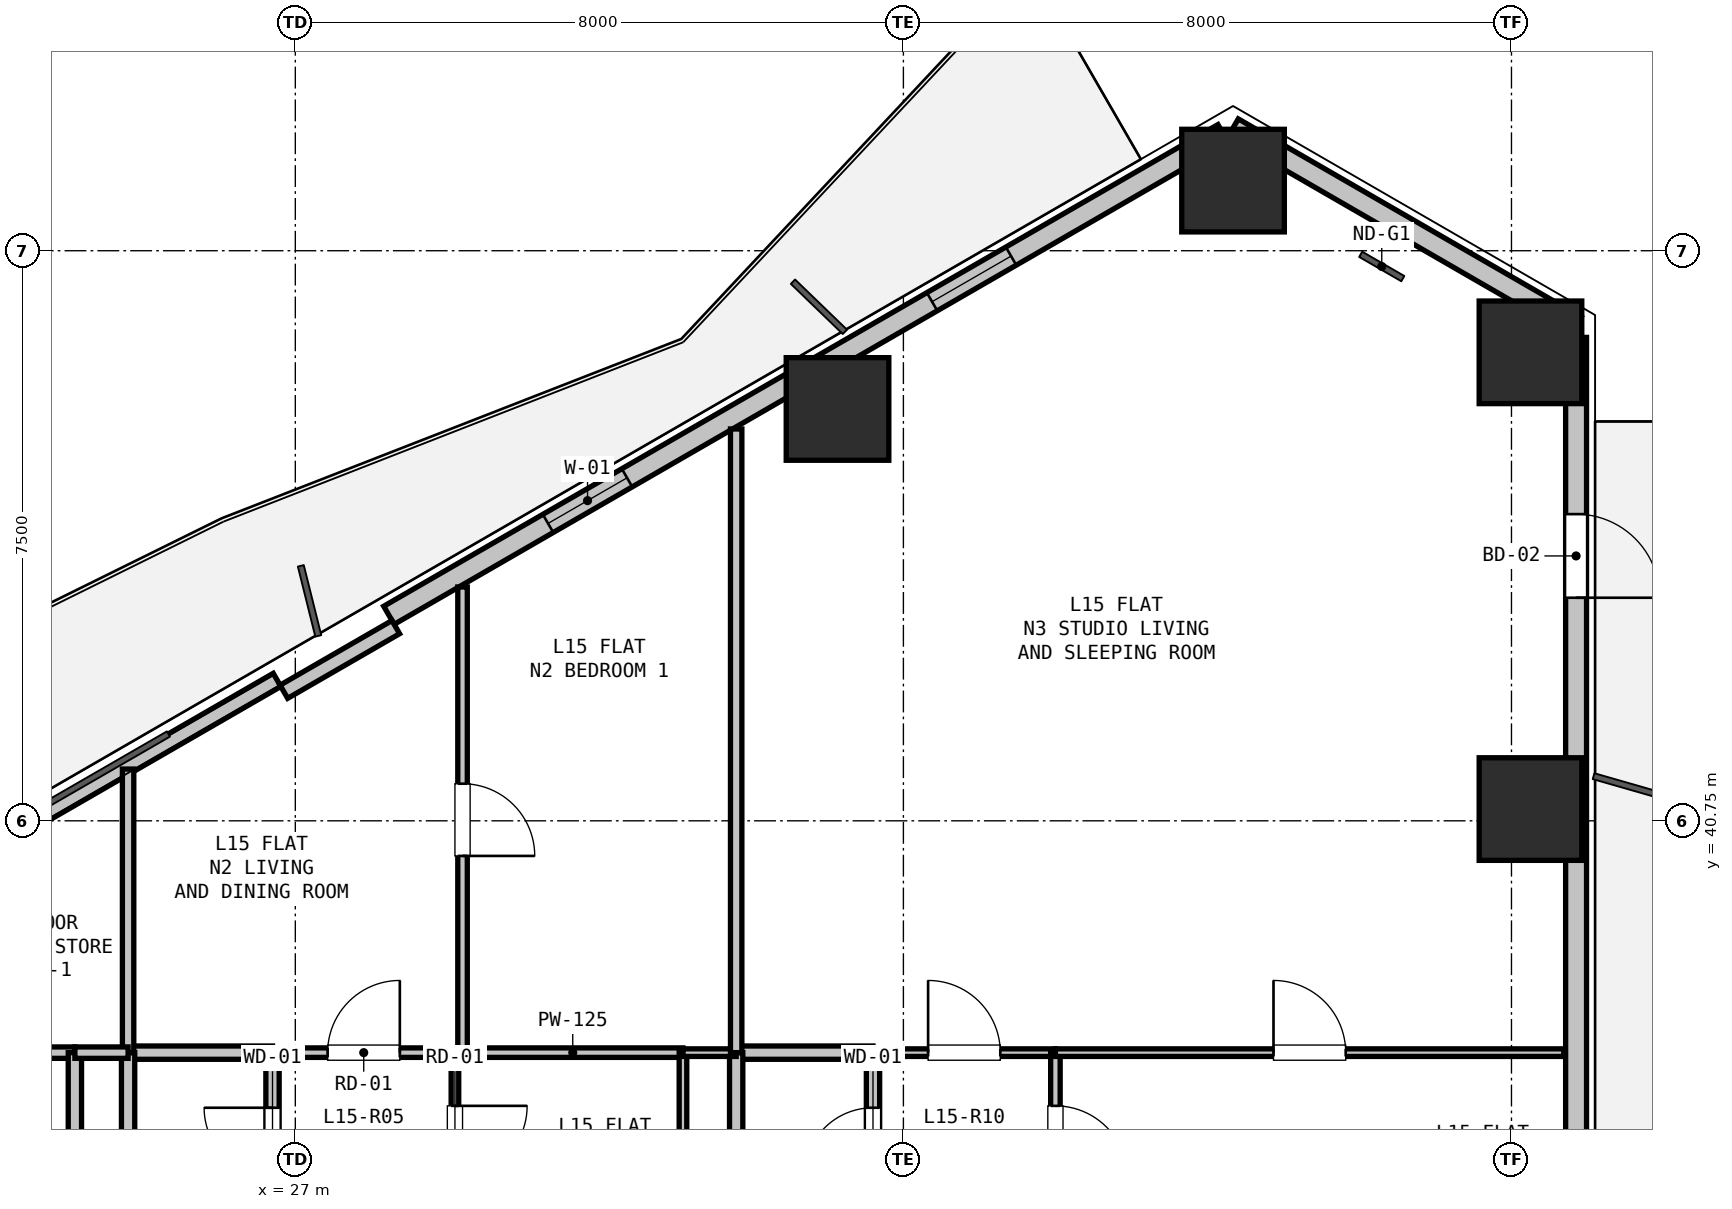
"""IFC4 building model, lengths in metres.
Left out: names, types, materials, properties, quantities, classifications, styles, units other than length and angle.
Written with IfcOpenShell. Run it as: python <this file> out.ifc"""

import sys

from ifc_helpers import new_model, si_unit, direction, frame, frame_2d, origin, origin_2d, place, context, subcontext, project, spatial, rectangle, hollow_rectangle, extrude, element, fill, save


model = new_model("IFC4")
c1 = context("Model", 3, precision=1e-05, world=origin(), true_north=direction((0.0, 1.0)))
c2 = subcontext(c1, "Body", "Model", "MODEL_VIEW")
j1 = project(units=[si_unit("LENGTHUNIT", "METRE"), si_unit("PLANEANGLEUNIT", "RADIAN")], contexts=[c1])
p1 = place(None, origin())
s1 = spatial("IfcSite", under=j1, at=p1, CompositionType="ELEMENT")
p2 = place(p1, origin())
s2 = spatial("IfcBuilding", under=s1, at=p2, CompositionType="ELEMENT")
p3 = place(p2, frame((0.0, 0.0, 55.5)))
s3 = spatial("IfcBuildingStorey", under=s2, at=p3, CompositionType="ELEMENT", Elevation=55.5)
for number, where, z_axis, x_axis in (
    (1, (34.133, 46.168, 0.0), (0.0, 0.0, 1.0), (1.0, 0.0, 0.0)),
    (2, (39.337, 49.173, 0.0), (0.0, 0.0, 1.0), (1.0, 0.0, 0.0)),
    (3, (43.25, 46.913, 0.0), (0.0, 0.0, 1.0), (1.0, 0.0, 0.0)),
    (4, (43.25, 40.905, 0.0), (0.0, 0.0, 1.0), (1.0, 0.0, 0.0)),
):
    element("IfcColumn", number, at=place(p3, frame(where, z_axis=z_axis, x_axis=x_axis)), inside=s3, PredefinedType="COLUMN", context=c2, shape_type="SweptSolid", body=[
        extrude(hollow_rectangle(XDim=1.35, YDim=1.35, WallThickness=0.036, at=origin_2d()), origin(), (0.0, 0.0, 1.0), 3.3),
    ])
p4 = place(p3, frame((39.337, 49.865, 0.0), z_axis=(0.0, 0.0, 1.0), x_axis=(0.866043601342, -0.499968479581, 0.0)))
e5 = element("IfcWall", 5, at=p4, inside=s3, PredefinedType="SOLIDWALL", context=c2, shape_type="SweptSolid", body=[
    extrude(rectangle(XDim=5.211, YDim=0.275, at=frame_2d((2.605, 0.0))), origin(), (0.0, 0.0, 1.0), 2.66),
])
p5 = place(p3, frame((16.39, 36.617, 0.0), z_axis=(0.0, 0.0, 1.0), x_axis=(0.866027351828, 0.499996625875, 0.0)))
e6 = element("IfcWall", 6, at=p5, inside=s3, PredefinedType="PARAPET", context=c2, shape_type="SweptSolid", body=[
    extrude(rectangle(XDim=11.973, YDim=0.2, at=frame_2d((5.987, 0.0))), origin(), (0.0, 0.0, 1.0), 0.2),
])
p6 = place(p3, frame((28.232, 43.454, 0.0), z_axis=(0.0, 0.0, 1.0), x_axis=(0.86603192154, 0.499988710747, 0.0)))
e7 = element("IfcWall", 7, at=p6, inside=s3, PredefinedType="SOLIDWALL", context=c2, shape_type="SweptSolid", body=[
    extrude(rectangle(XDim=12.673, YDim=0.275, at=frame_2d((6.336, 0.0))), origin(), (0.0, 0.0, 1.0), 2.66),
])
p7 = place(p6, frame((2.417, 0.0, 0.9)))
e8 = element("IfcOpeningElement", 8, at=p7, cuts=e7, PredefinedType="OPENING", context=c2, shape_type="SweptSolid", body=[
    extrude(rectangle(XDim=1.2, YDim=1.4, at=frame_2d((0.6, 0.7))), frame((0.0, 0.147, 0.0), z_axis=(0.0, -1.0, 0.0), x_axis=(1.0, 0.0, 0.0)), (0.0, 0.0, 1.0), 0.295),
])
p8 = place(p6, frame((8.251, 0.0, 0.9)))
e9 = element("IfcOpeningElement", 9, at=p8, cuts=e7, PredefinedType="OPENING", context=c2, shape_type="SweptSolid", body=[
    extrude(rectangle(XDim=1.2, YDim=1.4, at=frame_2d((0.6, 0.7))), frame((0.0, 0.147, 0.0), z_axis=(0.0, -1.0, 0.0), x_axis=(1.0, 0.0, 0.0)), (0.0, 0.0, 1.0), 0.295),
])
p9 = place(p3, frame((26.85, 42.448, 0.0), z_axis=(0.0, 0.0, 1.0), x_axis=(0.86605165483, 0.499954529098, 0.0)))
e10 = element("IfcWall", 10, at=p9, inside=s3, PredefinedType="PARAPET", context=c2, shape_type="SweptSolid", body=[
    extrude(rectangle(XDim=1.7, YDim=0.2, at=frame_2d((0.85, 0.0))), origin(), (0.0, 0.0, 1.0), 2.66),
])
p10 = place(p3, frame((43.85, 47.11, 0.0), z_axis=(0.0, 0.0, 1.0), x_axis=(0.0, -1.0, 0.0)))
e11 = element("IfcWall", 11, at=p10, inside=s3, PredefinedType="SOLIDWALL", context=c2, shape_type="SweptSolid", body=[
    extrude(rectangle(XDim=12.673, YDim=0.275, at=frame_2d((6.336, 0.0))), origin(), (0.0, 0.0, 1.0), 2.66),
])
p11 = place(p10, frame((2.325, 0.0, 0.0)))
e12 = element("IfcOpeningElement", 12, at=p11, cuts=e11, PredefinedType="OPENING", context=c2, shape_type="SweptSolid", body=[
    extrude(rectangle(XDim=1.1, YDim=2.1, at=frame_2d((0.55, 1.05))), frame((0.0, 0.147, 0.0), z_axis=(0.0, -1.0, 0.0), x_axis=(1.0, 0.0, 0.0)), (0.0, 0.0, 1.0), 0.295),
])
p12 = place(p3, frame((26.7, 37.7, 0.0), z_axis=(0.0, 0.0, 1.0), x_axis=(1.0, 0.0, 0.0)))
e13 = element("IfcWall", 13, at=p12, inside=s3, PredefinedType="PARTITIONING", context=c2, shape_type="SweptSolid", body=[
    extrude(rectangle(XDim=2.4, YDim=0.125, at=frame_2d((1.2, 0.0))), origin(), (0.0, 0.0, 1.0), 3.04),
])
p13 = place(p12, frame((0.725, 0.0, 0.0)))
e14 = element("IfcOpeningElement", 14, at=p13, cuts=e13, PredefinedType="OPENING", context=c2, shape_type="SweptSolid", body=[
    extrude(rectangle(XDim=0.95, YDim=2.1, at=frame_2d((0.475, 1.05))), frame((0.0, 0.073, 0.0), z_axis=(0.0, -1.0, 0.0), x_axis=(1.0, 0.0, 0.0)), (0.0, 0.0, 1.0), 0.145),
])
p14 = place(p3, frame((29.1, 37.7, 0.0), z_axis=(0.0, 0.0, 1.0), x_axis=(0.0, -1.0, 0.0)))
e15 = element("IfcWall", 15, at=p14, inside=s3, PredefinedType="PARTITIONING", context=c2, shape_type="SweptSolid", body=[
    extrude(rectangle(XDim=2.35, YDim=0.1, at=frame_2d((1.175, 0.0))), origin(), (0.0, 0.0, 1.0), 3.04),
])
p15 = place(p14, frame((0.7, 0.0, 0.0)))
e16 = element("IfcOpeningElement", 16, at=p15, cuts=e15, PredefinedType="OPENING", context=c2, shape_type="SweptSolid", body=[
    extrude(rectangle(XDim=0.95, YDim=2.1, at=frame_2d((0.475, 1.05))), frame((0.0, 0.06, 0.0), z_axis=(0.0, -1.0, 0.0), x_axis=(1.0, 0.0, 0.0)), (0.0, 0.0, 1.0), 0.12),
])
p16 = place(p3, frame((26.7, 35.35, 0.0), z_axis=(0.0, 0.0, 1.0), x_axis=(0.0, 1.0, 0.0)))
e17 = element("IfcWall", 17, at=p16, inside=s3, PredefinedType="PLUMBINGWALL", context=c2, shape_type="SweptSolid", body=[
    extrude(rectangle(XDim=2.35, YDim=0.175, at=frame_2d((1.175, 0.0))), origin(), (0.0, 0.0, 1.0), 3.04),
])
p17 = place(p16, frame((0.725, 0.0, 0.0)))
e18 = element("IfcOpeningElement", 18, at=p17, cuts=e17, PredefinedType="OPENING", context=c2, shape_type="SweptSolid", body=[
    extrude(rectangle(XDim=0.9, YDim=2.1, at=frame_2d((0.45, 1.05))), frame((0.0, 0.097, 0.0), z_axis=(0.0, -1.0, 0.0), x_axis=(1.0, 0.0, 0.0)), (0.0, 0.0, 1.0), 0.195),
])
p18 = place(p3, frame((34.6, 37.7, 0.0), z_axis=(0.0, 0.0, 1.0), x_axis=(1.0, 0.0, 0.0)))
e19 = element("IfcWall", 19, at=p18, inside=s3, PredefinedType="PARTITIONING", context=c2, shape_type="SweptSolid", body=[
    extrude(rectangle(XDim=2.4, YDim=0.1, at=frame_2d((1.2, 0.0))), origin(), (0.0, 0.0, 1.0), 2.337),
])
p19 = place(p18, frame((0.725, 0.0, 0.0)))
e20 = element("IfcOpeningElement", 20, at=p19, cuts=e19, PredefinedType="OPENING", context=c2, shape_type="SweptSolid", body=[
    extrude(rectangle(XDim=0.95, YDim=2.1, at=frame_2d((0.475, 1.05))), frame((0.0, 0.06, 0.0), z_axis=(0.0, -1.0, 0.0), x_axis=(1.0, 0.0, 0.0)), (0.0, 0.0, 1.0), 0.12),
])
p20 = place(p3, frame((37.0, 37.7, 0.0), z_axis=(0.0, 0.0, 1.0), x_axis=(0.0, -1.0, 0.0)))
e21 = element("IfcWall", 21, at=p20, inside=s3, PredefinedType="PARTITIONING", context=c2, shape_type="SweptSolid", body=[
    extrude(rectangle(XDim=2.35, YDim=0.125, at=frame_2d((1.175, 0.0))), origin(), (0.0, 0.0, 1.0), 2.337),
])
p21 = place(p20, frame((0.7, 0.0, 0.0)))
e22 = element("IfcOpeningElement", 22, at=p21, cuts=e21, PredefinedType="OPENING", context=c2, shape_type="SweptSolid", body=[
    extrude(rectangle(XDim=0.95, YDim=2.1, at=frame_2d((0.475, 1.05))), frame((0.0, 0.073, 0.0), z_axis=(0.0, -1.0, 0.0), x_axis=(1.0, 0.0, 0.0)), (0.0, 0.0, 1.0), 0.145),
])
p22 = place(p3, frame((34.6, 35.35, 0.0), z_axis=(0.0, 0.0, 1.0), x_axis=(0.0, 1.0, 0.0)))
e23 = element("IfcWall", 23, at=p22, inside=s3, PredefinedType="PLUMBINGWALL", context=c2, shape_type="SweptSolid", body=[
    extrude(rectangle(XDim=2.35, YDim=0.175, at=frame_2d((1.175, 0.0))), origin(), (0.0, 0.0, 1.0), 3.04),
])
p23 = place(p22, frame((0.725, 0.0, 0.0)))
e24 = element("IfcOpeningElement", 24, at=p23, cuts=e23, PredefinedType="OPENING", context=c2, shape_type="SweptSolid", body=[
    extrude(rectangle(XDim=0.9, YDim=2.1, at=frame_2d((0.45, 1.05))), frame((0.0, 0.097, 0.0), z_axis=(0.0, -1.0, 0.0), x_axis=(1.0, 0.0, 0.0)), (0.0, 0.0, 1.0), 0.195),
])
p24 = place(p3, frame((22.3, 37.7, 0.0), z_axis=(0.0, 0.0, 1.0), x_axis=(1.0, 0.0, 0.0)))
e25 = element("IfcWall", 25, at=p24, inside=s3, PredefinedType="PARTITIONING", context=c2, shape_type="SweptSolid", body=[
    extrude(rectangle(XDim=1.8, YDim=0.15, at=frame_2d((0.9, 0.0))), origin(), (0.0, 0.0, 1.0), 3.04),
])
p25 = place(p3, frame((24.1, 37.7, 0.0), z_axis=(0.0, 0.0, 1.0), x_axis=(0.0, -1.0, 0.0)))
e26 = element("IfcWall", 26, at=p25, inside=s3, PredefinedType="PLUMBINGWALL", context=c2, shape_type="SweptSolid", body=[
    extrude(rectangle(XDim=2.35, YDim=0.175, at=frame_2d((1.175, 0.0))), origin(), (0.0, 0.0, 1.0), 3.04),
])
p26 = place(p3, frame((24.8, 37.7, 0.0), z_axis=(0.0, 0.0, 1.0), x_axis=(1.0, 0.0, 0.0)))
e27 = element("IfcWall", 27, at=p26, inside=s3, PredefinedType="PLUMBINGWALL", context=c2, shape_type="SweptSolid", body=[
    extrude(rectangle(XDim=1.9, YDim=0.175, at=frame_2d((0.95, 0.0))), origin(), (0.0, 0.0, 1.0), 3.04),
])
p27 = place(p3, frame((24.8, 35.35, 0.0), z_axis=(0.0, 0.0, 1.0), x_axis=(0.0, 1.0, 0.0)))
e28 = element("IfcWall", 28, at=p27, inside=s3, PredefinedType="PLUMBINGWALL", context=c2, shape_type="SweptSolid", body=[
    extrude(rectangle(XDim=2.35, YDim=0.175, at=frame_2d((1.175, 0.0))), origin(), (0.0, 0.0, 1.0), 3.04),
])
p28 = place(p3, frame((29.2, 37.7, 0.0), z_axis=(0.0, 0.0, 1.0), x_axis=(1.0, 0.0, 0.0)))
e29 = element("IfcWall", 29, at=p28, inside=s3, PredefinedType="PARTITIONING", context=c2, shape_type="SweptSolid", body=[
    extrude(rectangle(XDim=2.9, YDim=0.125, at=frame_2d((1.45, 0.0))), origin(), (0.0, 0.0, 1.0), 3.04),
])
p29 = place(p3, frame((32.1, 37.7, 0.0), z_axis=(0.0, 0.0, 1.0), x_axis=(0.0, -1.0, 0.0)))
e30 = element("IfcWall", 30, at=p29, inside=s3, PredefinedType="PARTITIONING", context=c2, shape_type="SweptSolid", body=[
    extrude(rectangle(XDim=2.35, YDim=0.1, at=frame_2d((1.175, 0.0))), origin(), (0.0, 0.0, 1.0), 3.04),
])
p30 = place(p3, frame((32.8, 37.7, 0.0), z_axis=(0.0, 0.0, 1.0), x_axis=(1.0, 0.0, 0.0)))
e31 = element("IfcWall", 31, at=p30, inside=s3, PredefinedType="PLUMBINGWALL", context=c2, shape_type="SweptSolid", body=[
    extrude(rectangle(XDim=1.8, YDim=0.175, at=frame_2d((0.9, 0.0))), origin(), (0.0, 0.0, 1.0), 3.04),
])
p31 = place(p3, frame((32.8, 35.35, 0.0), z_axis=(0.0, 0.0, 1.0), x_axis=(0.0, 1.0, 0.0)))
e32 = element("IfcWall", 32, at=p31, inside=s3, PredefinedType="PLUMBINGWALL", context=c2, shape_type="SweptSolid", body=[
    extrude(rectangle(XDim=2.35, YDim=0.175, at=frame_2d((1.175, 0.0))), origin(), (0.0, 0.0, 1.0), 3.04),
])
p32 = place(p3, frame((37.0, 37.7, 0.0), z_axis=(0.0, 0.0, 1.0), x_axis=(1.0, 0.0, 0.0)))
e33 = element("IfcWall", 33, at=p32, inside=s3, PredefinedType="PARTITIONING", context=c2, shape_type="SweptSolid", body=[
    extrude(rectangle(XDim=6.688, YDim=0.1, at=frame_2d((3.344, 0.0))), origin(), (0.0, 0.0, 1.0), 2.337),
])
p33 = place(p32, frame((2.869, 0.0, 0.0)))
e34 = element("IfcOpeningElement", 34, at=p33, cuts=e33, PredefinedType="OPENING", context=c2, shape_type="SweptSolid", body=[
    extrude(rectangle(XDim=0.95, YDim=2.1, at=frame_2d((0.475, 1.05))), frame((0.0, 0.06, 0.0), z_axis=(0.0, -1.0, 0.0), x_axis=(1.0, 0.0, 0.0)), (0.0, 0.0, 1.0), 0.12),
])
p34 = place(p3, frame((24.8, 41.431, 0.0), z_axis=(0.0, 0.0, 1.0), x_axis=(0.0, -1.0, 0.0)))
e35 = element("IfcWall", 35, at=p34, inside=s3, PredefinedType="PARTITIONING", context=c2, shape_type="SweptSolid", body=[
    extrude(rectangle(XDim=3.731, YDim=0.15, at=frame_2d((1.865, 0.0))), origin(), (0.0, 0.0, 1.0), 2.365),
])
p35 = place(p3, frame((24.8, 37.7, 0.0), z_axis=(0.0, 0.0, 1.0), x_axis=(-1.0, 0.0, 0.0)))
e36 = element("IfcWall", 36, at=p35, inside=s3, PredefinedType="PARTITIONING", context=c2, shape_type="SweptSolid", body=[
    extrude(rectangle(XDim=0.7, YDim=0.15, at=frame_2d((0.35, 0.0))), origin(), (0.0, 0.0, 1.0), 3.04),
])
p36 = place(p3, frame((29.2, 43.826, 0.0), z_axis=(0.0, 0.0, 1.0), x_axis=(0.0, -1.0, 0.0)))
e37 = element("IfcWall", 37, at=p36, inside=s3, PredefinedType="PARTITIONING", context=c2, shape_type="SweptSolid", body=[
    extrude(rectangle(XDim=6.126, YDim=0.125, at=frame_2d((3.063, 0.0))), origin(), (0.0, 0.0, 1.0), 2.365),
])
p37 = place(p36, frame((2.588, 0.0, 0.0)))
e38 = element("IfcOpeningElement", 38, at=p37, cuts=e37, PredefinedType="OPENING", context=c2, shape_type="SweptSolid", body=[
    extrude(rectangle(XDim=0.95, YDim=2.1, at=frame_2d((0.475, 1.05))), frame((0.0, 0.073, 0.0), z_axis=(0.0, -1.0, 0.0), x_axis=(1.0, 0.0, 0.0)), (0.0, 0.0, 1.0), 0.145),
])
p38 = place(p3, frame((32.8, 37.7, 0.0), z_axis=(0.0, 0.0, 1.0), x_axis=(-1.0, 0.0, 0.0)))
e39 = element("IfcWall", 39, at=p38, inside=s3, PredefinedType="PARTITIONING", context=c2, shape_type="SweptSolid", body=[
    extrude(rectangle(XDim=0.7, YDim=0.1, at=frame_2d((0.35, 0.0))), origin(), (0.0, 0.0, 1.0), 3.04),
])
p39 = place(p3, frame((32.8, 45.905, 0.0), z_axis=(0.0, 0.0, 1.0), x_axis=(0.0, -1.0, 0.0)))
e40 = element("IfcWall", 40, at=p39, inside=s3, PredefinedType="PARTITIONING", context=c2, shape_type="SweptSolid", body=[
    extrude(rectangle(XDim=8.205, YDim=0.15, at=frame_2d((4.103, 0.0))), origin(), (0.0, 0.0, 1.0), 2.365),
])
p40 = place(p7, origin())
e41 = element("IfcWindow", 41, at=p40, inside=s3, PartitioningType="SINGLE_PANEL", PredefinedType="WINDOW", context=c2, shape_type="SweptSolid", body=[
    extrude(rectangle(XDim=1.2, YDim=1.4, at=frame_2d((0.6, 0.7))), frame((0.0, 0.03, 0.0), z_axis=(0.0, -1.0, 0.0), x_axis=(1.0, 0.0, 0.0)), (0.0, 0.0, 1.0), 0.06),
])
fill(e8, e41)
p41 = place(p8, origin())
e42 = element("IfcWindow", 42, at=p41, inside=s3, PartitioningType="SINGLE_PANEL", PredefinedType="WINDOW", context=c2, shape_type="SweptSolid", body=[
    extrude(rectangle(XDim=1.2, YDim=1.4, at=frame_2d((0.6, 0.7))), frame((0.0, 0.03, 0.0), z_axis=(0.0, -1.0, 0.0), x_axis=(1.0, 0.0, 0.0)), (0.0, 0.0, 1.0), 0.06),
])
fill(e9, e42)
p42 = place(p11, origin())
e43 = element("IfcDoor", 43, at=p42, inside=s3, OperationType="SINGLE_SWING_RIGHT", PredefinedType="DOOR", context=c2, shape_type="SweptSolid", body=[
    extrude(rectangle(XDim=1.1, YDim=2.1, at=frame_2d((0.55, 1.05))), frame((0.0, 0.025, 0.0), z_axis=(0.0, -1.0, 0.0), x_axis=(1.0, 0.0, 0.0)), (0.0, 0.0, 1.0), 0.05),
])
fill(e12, e43)
p43 = place(p17, origin())
e44 = element("IfcDoor", 44, at=p43, inside=s3, OperationType="SINGLE_SWING_RIGHT", PredefinedType="DOOR", context=c2, shape_type="SweptSolid", body=[
    extrude(rectangle(XDim=0.9, YDim=2.1, at=frame_2d((0.45, 1.05))), frame((0.0, 0.025, 0.0), z_axis=(0.0, -1.0, 0.0), x_axis=(1.0, 0.0, 0.0)), (0.0, 0.0, 1.0), 0.05),
])
fill(e18, e44)
p44 = place(p15, origin())
e45 = element("IfcDoor", 45, at=p44, inside=s3, OperationType="SINGLE_SWING_LEFT", PredefinedType="DOOR", context=c2, shape_type="SweptSolid", body=[
    extrude(rectangle(XDim=0.95, YDim=2.1, at=frame_2d((0.475, 1.05))), frame((0.0, 0.025, 0.0), z_axis=(0.0, -1.0, 0.0), x_axis=(1.0, 0.0, 0.0)), (0.0, 0.0, 1.0), 0.05),
])
fill(e16, e45)
p45 = place(p13, origin())
e46 = element("IfcDoor", 46, at=p45, inside=s3, OperationType="SINGLE_SWING_RIGHT", PredefinedType="DOOR", context=c2, shape_type="SweptSolid", body=[
    extrude(rectangle(XDim=0.95, YDim=2.1, at=frame_2d((0.475, 1.05))), frame((0.0, 0.025, 0.0), z_axis=(0.0, -1.0, 0.0), x_axis=(1.0, 0.0, 0.0)), (0.0, 0.0, 1.0), 0.05),
])
fill(e14, e46)
p46 = place(p23, origin())
e47 = element("IfcDoor", 47, at=p46, inside=s3, OperationType="SINGLE_SWING_LEFT", PredefinedType="DOOR", context=c2, shape_type="SweptSolid", body=[
    extrude(rectangle(XDim=0.9, YDim=2.1, at=frame_2d((0.45, 1.05))), frame((0.0, 0.025, 0.0), z_axis=(0.0, -1.0, 0.0), x_axis=(1.0, 0.0, 0.0)), (0.0, 0.0, 1.0), 0.05),
])
fill(e24, e47)
p47 = place(p21, origin())
e48 = element("IfcDoor", 48, at=p47, inside=s3, OperationType="SINGLE_SWING_RIGHT", PredefinedType="DOOR", context=c2, shape_type="SweptSolid", body=[
    extrude(rectangle(XDim=0.95, YDim=2.1, at=frame_2d((0.475, 1.05))), frame((0.0, 0.025, 0.0), z_axis=(0.0, -1.0, 0.0), x_axis=(1.0, 0.0, 0.0)), (0.0, 0.0, 1.0), 0.05),
])
fill(e22, e48)
p48 = place(p19, origin())
e49 = element("IfcDoor", 49, at=p48, inside=s3, OperationType="SINGLE_SWING_LEFT", PredefinedType="DOOR", context=c2, shape_type="SweptSolid", body=[
    extrude(rectangle(XDim=0.95, YDim=2.1, at=frame_2d((0.475, 1.05))), frame((0.0, 0.025, 0.0), z_axis=(0.0, -1.0, 0.0), x_axis=(1.0, 0.0, 0.0)), (0.0, 0.0, 1.0), 0.05),
])
fill(e20, e49)
p49 = place(p33, origin())
e50 = element("IfcDoor", 50, at=p49, inside=s3, OperationType="SINGLE_SWING_LEFT", PredefinedType="DOOR", context=c2, shape_type="SweptSolid", body=[
    extrude(rectangle(XDim=0.95, YDim=2.1, at=frame_2d((0.475, 1.05))), frame((0.0, 0.025, 0.0), z_axis=(0.0, -1.0, 0.0), x_axis=(1.0, 0.0, 0.0)), (0.0, 0.0, 1.0), 0.05),
])
fill(e34, e50)
p50 = place(p37, origin())
e51 = element("IfcDoor", 51, at=p50, inside=s3, OperationType="SINGLE_SWING_RIGHT", PredefinedType="DOOR", context=c2, shape_type="SweptSolid", body=[
    extrude(rectangle(XDim=0.95, YDim=2.1, at=frame_2d((0.475, 1.05))), frame((0.0, 0.025, 0.0), z_axis=(0.0, -1.0, 0.0), x_axis=(1.0, 0.0, 0.0)), (0.0, 0.0, 1.0), 0.05),
])
fill(e38, e51)
save(model, sys.argv[1])
